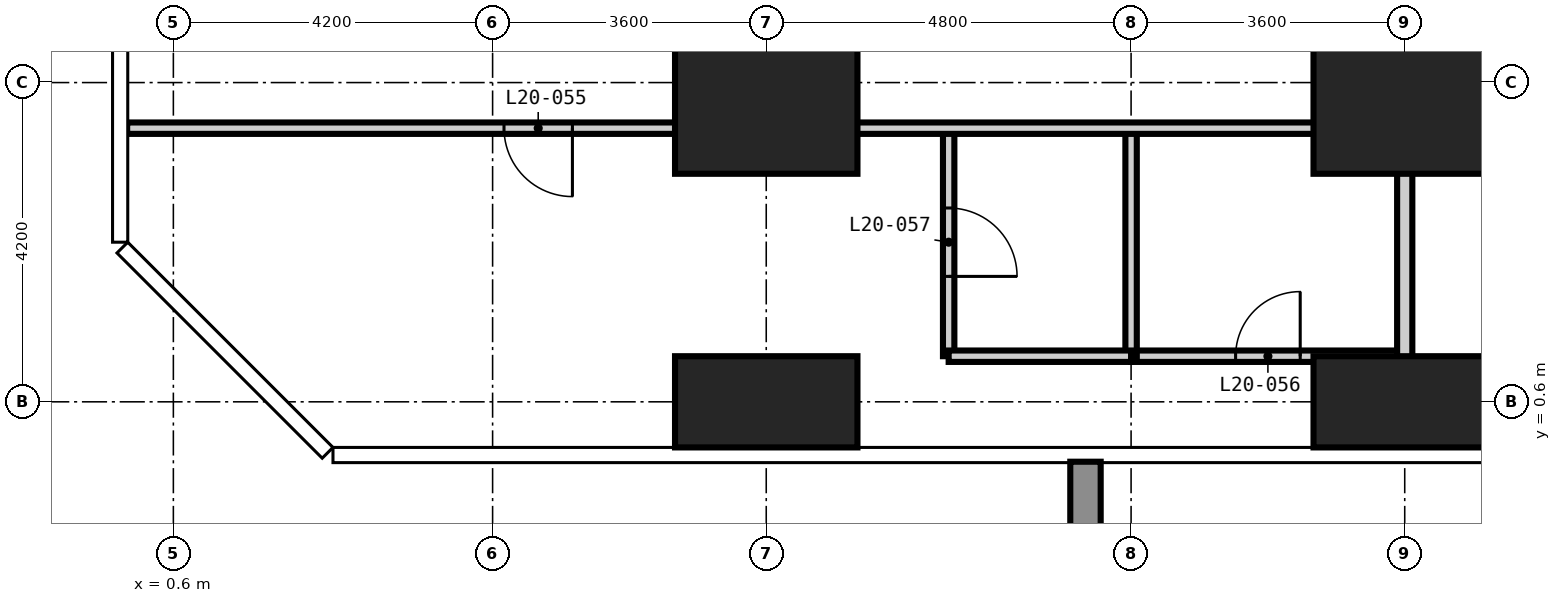
"""IFC4 building model, lengths in metres.
Left out: names, types, materials, properties, quantities, classifications, styles, units other than length and angle.
Written with IfcOpenShell. Run it as: python <this file> out.ifc"""

import sys

from ifc_helpers import new_model, si_unit, direction, frame, frame_2d, origin, origin_2d, place, context, subcontext, project, spatial, rectangle, extrude, element, fill, save


model = new_model("IFC4")
c1 = context("Model", 3, precision=1e-05, world=origin(), true_north=direction((0.0, 1.0)))
c2 = subcontext(c1, "Body", "Model", "MODEL_VIEW")
j1 = project(units=[si_unit("LENGTHUNIT", "METRE"), si_unit("PLANEANGLEUNIT", "RADIAN")], contexts=[c1])
p1 = place(None, origin())
s1 = spatial("IfcSite", under=j1, at=p1, CompositionType="ELEMENT")
p2 = place(p1, origin())
s2 = spatial("IfcBuilding", under=s1, at=p2, CompositionType="ELEMENT")
p3 = place(p2, frame((0.0, 0.0, 81.0)))
s3 = spatial("IfcBuildingStorey", under=s2, at=p3, CompositionType="ELEMENT", Elevation=81.0)
p4 = place(p3, frame((8.4, 0.6, -0.35), z_axis=(0.0, 0.0, 1.0), x_axis=(1.0, 0.0, 0.0)))
e1 = element("IfcColumn", 1, at=p4, inside=s3, PredefinedType="COLUMN", context=c2, shape_type="SweptSolid", body=[
    extrude(rectangle(XDim=2.4, YDim=1.2, at=origin_2d()), origin(), (0.0, 0.0, 1.0), 3.6),
])
p5 = place(p3, frame((8.4, 4.8, -0.35), z_axis=(0.0, 0.0, 1.0), x_axis=(1.0, 0.0, 0.0)))
e2 = element("IfcColumn", 2, at=p5, inside=s3, PredefinedType="COLUMN", context=c2, shape_type="SweptSolid", body=[
    extrude(rectangle(XDim=2.4, YDim=2.4, at=origin_2d()), origin(), (0.0, 0.0, 1.0), 3.6),
])
p6 = place(p3, frame((16.8, 0.6, -0.35), z_axis=(0.0, 0.0, 1.0), x_axis=(1.0, 0.0, 0.0)))
e3 = element("IfcColumn", 3, at=p6, inside=s3, PredefinedType="COLUMN", context=c2, shape_type="SweptSolid", body=[
    extrude(rectangle(XDim=2.4, YDim=1.2, at=origin_2d()), origin(), (0.0, 0.0, 1.0), 3.6),
])
p7 = place(p3, frame((16.8, 4.8, -0.35), z_axis=(0.0, 0.0, 1.0), x_axis=(1.0, 0.0, 0.0)))
e4 = element("IfcColumn", 4, at=p7, inside=s3, PredefinedType="COLUMN", context=c2, shape_type="SweptSolid", body=[
    extrude(rectangle(XDim=2.4, YDim=2.4, at=origin_2d()), origin(), (0.0, 0.0, 1.0), 3.6),
])
p8 = place(p3, frame((13.2, 1.2, 0.0), z_axis=(0.0, 0.0, 1.0), x_axis=(1.0, 0.0, 0.0)))
e5 = element("IfcWall", 5, at=p8, inside=s3, PredefinedType="PARTITIONING", context=c2, shape_type="SweptSolid", body=[
    extrude(rectangle(XDim=3.6, YDim=0.15, at=frame_2d((1.8, 0.0))), origin(), (0.0, 0.0, 1.0), 3.25),
])
p9 = place(p8, frame((1.375, 0.0, 0.0)))
e6 = element("IfcOpeningElement", 6, at=p9, cuts=e5, PredefinedType="OPENING", context=c2, shape_type="SweptSolid", body=[
    extrude(rectangle(XDim=0.85, YDim=2.1, at=frame_2d((0.425, 1.05))), frame((0.0, 0.085, 0.0), z_axis=(0.0, -1.0, 0.0), x_axis=(1.0, 0.0, 0.0)), (0.0, 0.0, 1.0), 0.17),
])
p10 = place(p3, frame((16.8, -0.008, 0.0), z_axis=(0.0, 0.0, 1.0), x_axis=(0.0, 1.0, 0.0)))
e7 = element("IfcWall", 7, at=p10, inside=s3, PredefinedType="PARTITIONING", context=c2, shape_type="SweptSolid", body=[
    extrude(rectangle(XDim=14.008, YDim=0.2, at=frame_2d((7.004, 0.0))), origin(), (0.0, 0.0, 1.0), 3.25),
])
p11 = place(p3, frame((10.8, 1.2, 0.0), z_axis=(0.0, 0.0, 1.0), x_axis=(0.0, 1.0, 0.0)))
e8 = element("IfcWall", 8, at=p11, inside=s3, PredefinedType="PARTITIONING", context=c2, shape_type="SweptSolid", body=[
    extrude(rectangle(XDim=3.0, YDim=0.15, at=frame_2d((1.5, 0.0))), origin(), (0.0, 0.0, 1.0), 3.25),
])
p12 = place(p11, frame((1.05, 0.0, 0.0)))
e9 = element("IfcOpeningElement", 9, at=p12, cuts=e8, PredefinedType="OPENING", context=c2, shape_type="SweptSolid", body=[
    extrude(rectangle(XDim=0.9, YDim=2.1, at=frame_2d((0.45, 1.05))), frame((0.0, 0.085, 0.0), z_axis=(0.0, -1.0, 0.0), x_axis=(1.0, 0.0, 0.0)), (0.0, 0.0, 1.0), 0.17),
])
p13 = place(p3, frame((13.2, 1.2, 0.0), z_axis=(0.0, 0.0, 1.0), x_axis=(0.0, 1.0, 0.0)))
e10 = element("IfcWall", 10, at=p13, inside=s3, PredefinedType="PARTITIONING", context=c2, shape_type="SweptSolid", body=[
    extrude(rectangle(XDim=3.0, YDim=0.15, at=frame_2d((1.5, 0.0))), origin(), (0.0, 0.0, 1.0), 3.25),
])
p14 = place(p3, frame((10.8, 1.2, 0.0), z_axis=(0.0, 0.0, 1.0), x_axis=(1.0, 0.0, 0.0)))
e11 = element("IfcWall", 11, at=p14, inside=s3, PredefinedType="PARTITIONING", context=c2, shape_type="SweptSolid", body=[
    extrude(rectangle(XDim=2.4, YDim=0.15, at=frame_2d((1.2, 0.0))), origin(), (0.0, 0.0, 1.0), 3.25),
])
p15 = place(p3, frame((-0.008, 4.2, 0.0), z_axis=(0.0, 0.0, 1.0), x_axis=(1.0, 0.0, 0.0)))
e12 = element("IfcWall", 12, at=p15, inside=s3, PredefinedType="PARTITIONING", context=c2, shape_type="SweptSolid", body=[
    extrude(rectangle(XDim=16.808, YDim=0.15, at=frame_2d((8.404, 0.0))), origin(), (0.0, 0.0, 1.0), 3.25),
])
p16 = place(p15, frame((4.958, 0.0, 0.0)))
e13 = element("IfcOpeningElement", 13, at=p16, cuts=e12, PredefinedType="OPENING", context=c2, shape_type="SweptSolid", body=[
    extrude(rectangle(XDim=0.9, YDim=2.1, at=frame_2d((0.45, 1.05))), frame((0.0, 0.085, 0.0), z_axis=(0.0, -1.0, 0.0), x_axis=(1.0, 0.0, 0.0)), (0.0, 0.0, 1.0), 0.17),
])
p17 = place(p16, frame((0.9, 0.0, 0.0), z_axis=(0.0, 0.0, 1.0), x_axis=(-1.0, 0.0, 0.0)))
e14 = element("IfcDoor", 14, at=p17, inside=s3, OperationType="SINGLE_SWING_LEFT", PredefinedType="DOOR", context=c2, shape_type="SweptSolid", body=[
    extrude(rectangle(XDim=0.9, YDim=2.1, at=frame_2d((0.45, 1.05))), frame((0.0, 0.025, 0.0), z_axis=(0.0, -1.0, 0.0), x_axis=(1.0, 0.0, 0.0)), (0.0, 0.0, 1.0), 0.05),
])
fill(e13, e14)
p18 = place(p9, origin())
e15 = element("IfcDoor", 15, at=p18, inside=s3, OperationType="SINGLE_SWING_RIGHT", PredefinedType="DOOR", context=c2, shape_type="SweptSolid", body=[
    extrude(rectangle(XDim=0.85, YDim=2.1, at=frame_2d((0.425, 1.05))), frame((0.0, 0.025, 0.0), z_axis=(0.0, -1.0, 0.0), x_axis=(1.0, 0.0, 0.0)), (0.0, 0.0, 1.0), 0.05),
])
fill(e6, e15)
p19 = place(p12, frame((0.9, 0.0, 0.0), z_axis=(0.0, 0.0, 1.0), x_axis=(-1.0, 0.0, 0.0)))
e16 = element("IfcDoor", 16, at=p19, inside=s3, OperationType="SINGLE_SWING_RIGHT", PredefinedType="DOOR", context=c2, shape_type="SweptSolid", body=[
    extrude(rectangle(XDim=0.9, YDim=2.1, at=frame_2d((0.45, 1.05))), frame((0.0, 0.025, 0.0), z_axis=(0.0, -1.0, 0.0), x_axis=(1.0, 0.0, 0.0)), (0.0, 0.0, 1.0), 0.05),
])
fill(e9, e16)
save(model, sys.argv[1])
